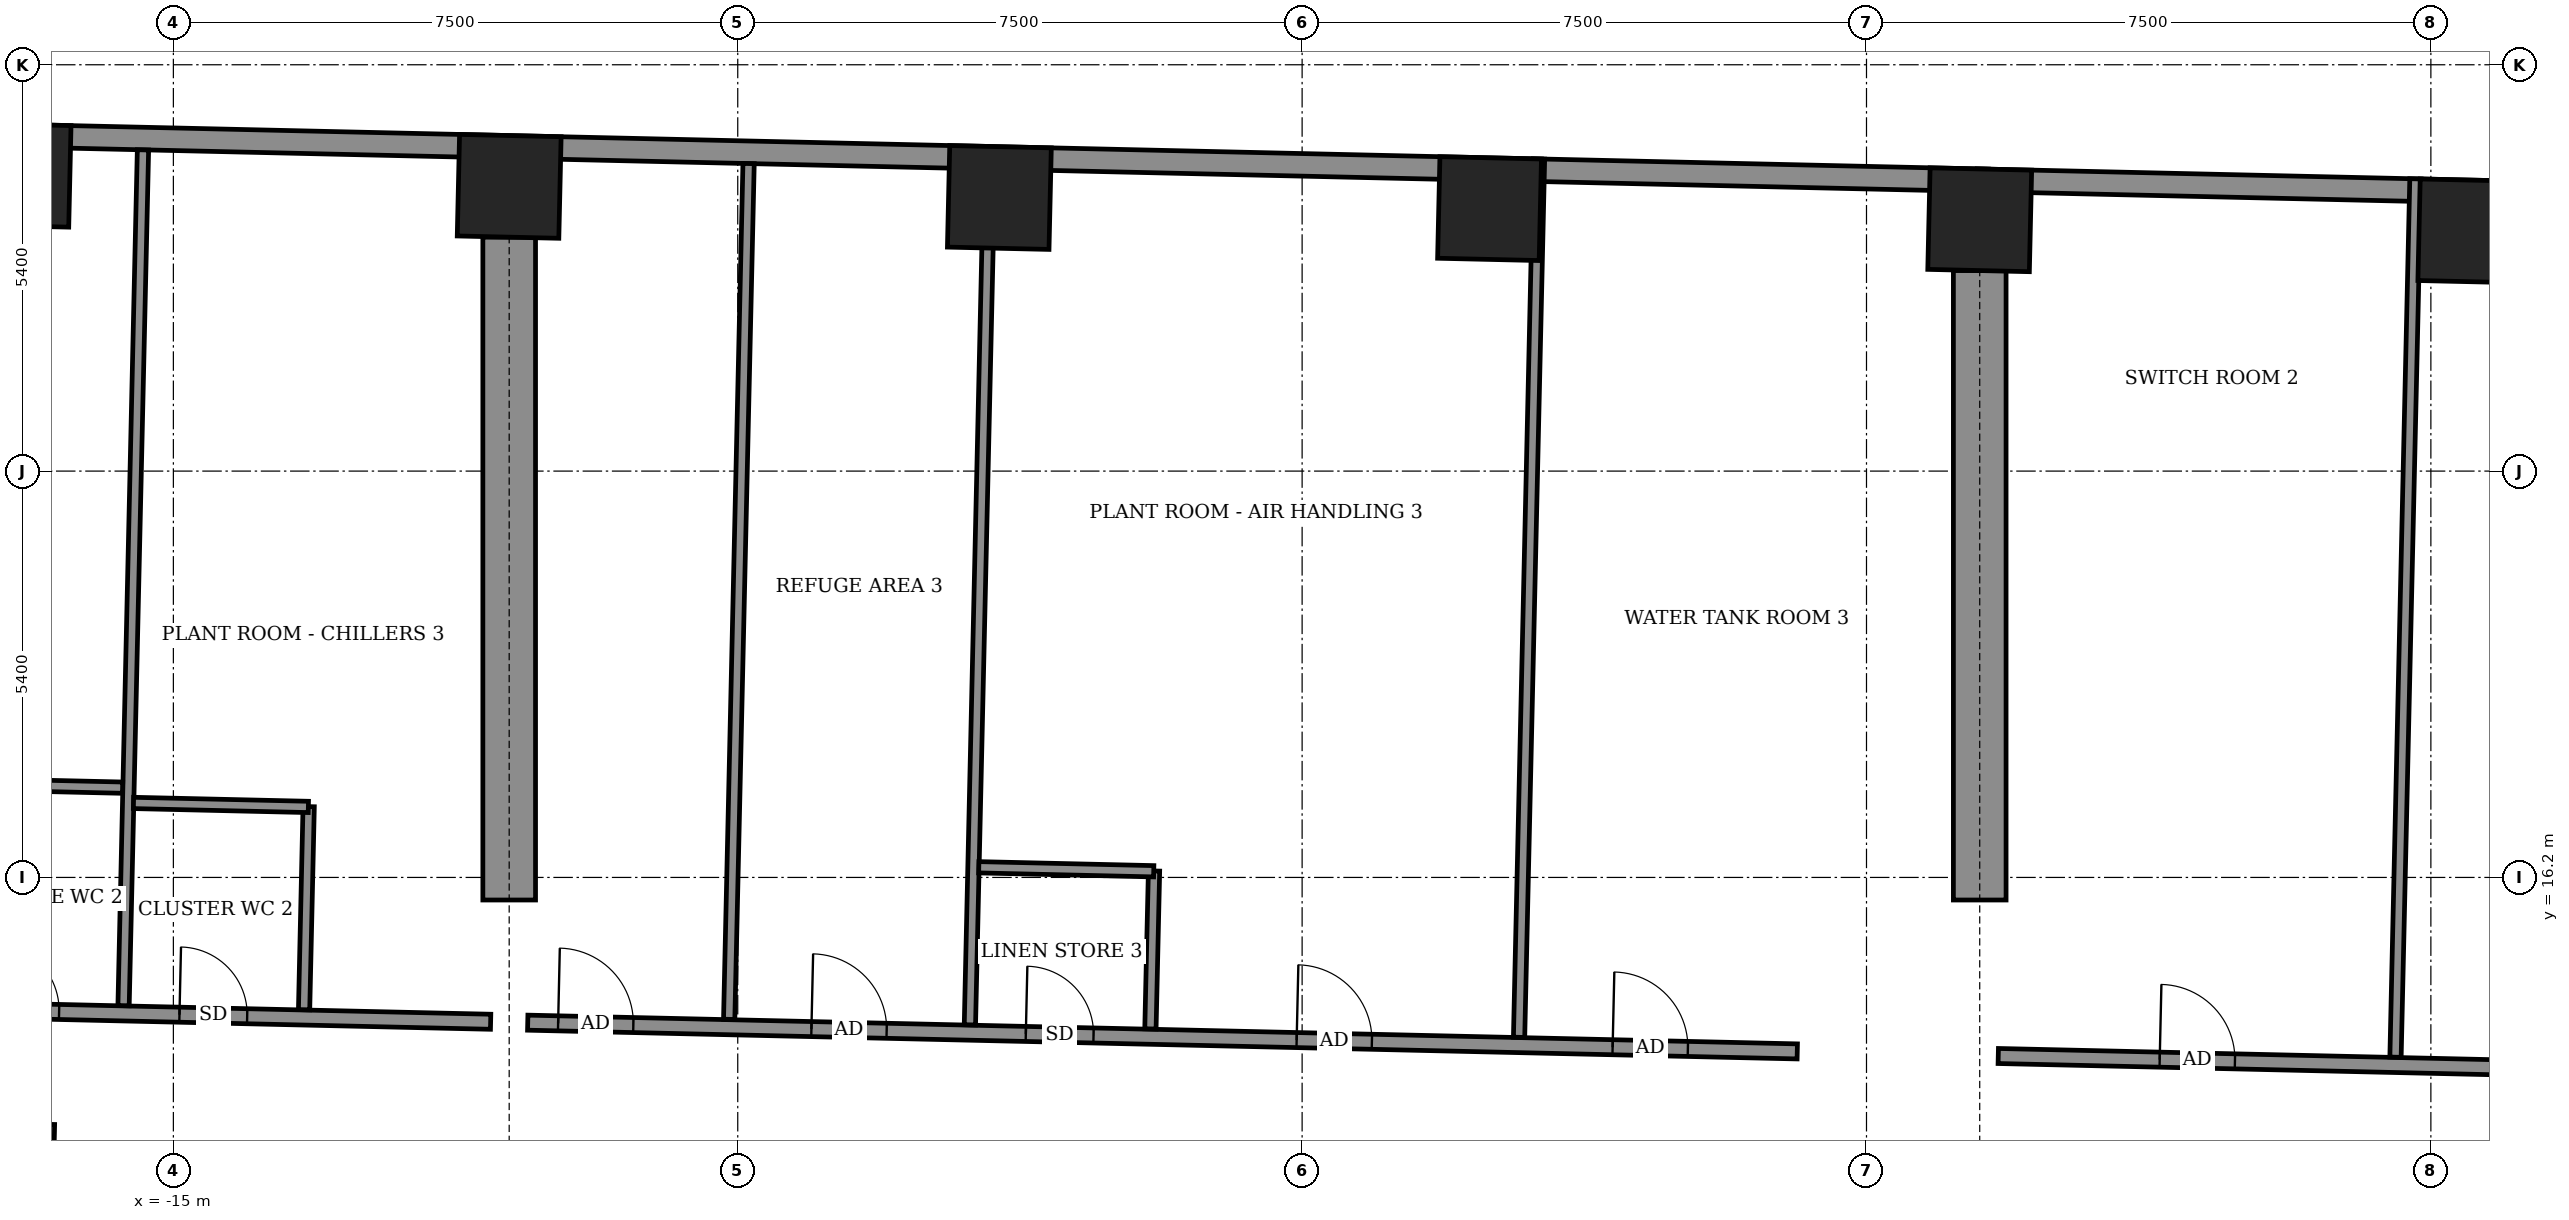
"""IFC4 building model, lengths in metres.
Left out: names, types, materials, properties, quantities, classifications, styles, units other than length and angle.
Written with IfcOpenShell. Run it as: python <this file> out.ifc"""

import sys

from ifc_helpers import new_model, si_unit, direction, frame, frame_2d, origin, origin_2d, place, context, subcontext, project, spatial, rectangle, extrude, element, fill, save


model = new_model("IFC4")
c1 = context("Model", 3, precision=1e-05, world=origin(), true_north=direction((0.0, 1.0)))
c2 = subcontext(c1, "Body", "Model", "MODEL_VIEW")
j1 = project(units=[si_unit("LENGTHUNIT", "METRE"), si_unit("PLANEANGLEUNIT", "RADIAN")], contexts=[c1])
p1 = place(None, origin())
s1 = spatial("IfcSite", under=j1, at=p1, CompositionType="ELEMENT")
p2 = place(p1, origin())
s2 = spatial("IfcBuilding", under=s1, at=p2, CompositionType="ELEMENT")
p3 = place(p2, frame((0.0, 0.0, 119.9)))
s3 = spatial("IfcBuildingStorey", under=s2, at=p3, CompositionType="ELEMENT", Elevation=119.9)
for number, where, z_axis, x_axis in (
    (1, (15.518, 24.792, -0.55), (0.0, 0.0, 1.0), (-1.0, 0.023, 0.0)),
    (2, (9.005, 24.94, -0.55), (0.0, 0.0, 1.0), (-1.0, 0.023, 0.0)),
    (3, (2.491, 25.088, -0.55), (0.0, 0.0, 1.0), (-1.0, 0.023, 0.0)),
    (4, (-4.023, 25.236, -0.55), (0.0, 0.0, 1.0), (-1.0, 0.023, 0.0)),
    (5, (-10.537, 25.384, -0.55), (0.0, 0.0, 1.0), (-1.0, 0.023, 0.0)),
    (6, (-17.05, 25.532, -0.55), (0.0, 0.0, 1.0), (-1.0, 0.023, 0.0)),
):
    element("IfcColumn", number, at=place(p3, frame(where, z_axis=z_axis, x_axis=x_axis)), inside=s3, PredefinedType="COLUMN", context=c2, shape_type="SweptSolid", body=[
        extrude(rectangle(XDim=1.35, YDim=1.35, at=origin_2d()), origin(), (0.0, 0.0, 1.0), 5.6),
    ])
p4 = place(p3, frame((9.005, 15.9, 0.0), z_axis=(0.0, 0.0, 1.0), x_axis=(0.0, 1.0, 0.0)))
e7 = element("IfcWall", 7, at=p4, inside=s3, PredefinedType="SHEAR", context=c2, shape_type="SweptSolid", body=[
    extrude(rectangle(XDim=8.365, YDim=0.7, at=frame_2d((4.183, 0.0))), origin(), (0.0, 0.0, 1.0), 3.0),
])
p5 = place(p3, frame((-10.537, 15.9, 0.0), z_axis=(0.0, 0.0, 1.0), x_axis=(0.0, 1.0, 0.0)))
e8 = element("IfcWall", 8, at=p5, inside=s3, PredefinedType="SHEAR", context=c2, shape_type="SweptSolid", body=[
    extrude(rectangle(XDim=8.809, YDim=0.7, at=frame_2d((4.405, 0.0))), origin(), (0.0, 0.0, 1.0), 3.0),
])
p6 = place(p3, frame((21.894, 25.173, 0.0), z_axis=(0.0, 0.0, 1.0), x_axis=(-0.999742661083, 0.022685052594, 0.0)))
e9 = element("IfcWall", 9, at=p6, inside=s3, PredefinedType="SOLIDWALL", context=c2, shape_type="SweptSolid", body=[
    extrude(rectangle(XDim=45.309, YDim=0.3, at=frame_2d((22.654, 0.0))), origin(), (0.0, 0.0, 1.0), 5.05),
])
p7 = place(p3, frame((-16.759, 9.368, 0.0), z_axis=(0.0, 0.0, 1.0), x_axis=(0.022819769377, 0.999739595157, 0.0)))
e10 = element("IfcWall", 10, at=p7, inside=s3, PredefinedType="PARTITIONING", context=c2, shape_type="SweptSolid", body=[
    extrude(rectangle(XDim=3.552, YDim=0.2, at=frame_2d((1.776, 0.0))), origin(), (0.0, 0.0, 1.0), 3.0),
])
p8 = place(p3, frame((-26.341, 14.635, 0.0), z_axis=(0.0, 0.0, 1.0), x_axis=(0.999742628706, -0.022686479412, 0.0)))
e11 = element("IfcWall", 11, at=p8, inside=s3, PredefinedType="PARTITIONING", context=c2, shape_type="SweptSolid", body=[
    extrude(rectangle(XDim=15.561, YDim=0.2, at=frame_2d((7.781, 0.0))), origin(), (0.0, 0.0, 1.0), 3.0),
])
p9 = place(p8, frame((11.425, 0.0, 0.0)))
e12 = element("IfcOpeningElement", 12, at=p9, cuts=e11, PredefinedType="OPENING", context=c2, shape_type="SweptSolid", body=[
    extrude(rectangle(XDim=0.9, YDim=2.1, at=frame_2d((0.45, 1.05))), frame((0.0, 0.11, 0.0), z_axis=(0.0, -1.0, 0.0), x_axis=(1.0, 0.0, 0.0)), (0.0, 0.0, 1.0), 0.22),
])
p10 = place(p8, frame((2.5, 0.0, 0.0)))
e13 = element("IfcOpeningElement", 13, at=p10, cuts=e11, PredefinedType="OPENING", context=c2, shape_type="SweptSolid", body=[
    extrude(rectangle(XDim=1.0, YDim=2.1, at=frame_2d((0.5, 1.05))), frame((0.0, 0.11, 0.0), z_axis=(0.0, -1.0, 0.0), x_axis=(1.0, 0.0, 0.0)), (0.0, 0.0, 1.0), 0.22),
])
p11 = place(p8, frame((8.925, 0.0, 0.0)))
e14 = element("IfcOpeningElement", 14, at=p11, cuts=e11, PredefinedType="OPENING", context=c2, shape_type="SweptSolid", body=[
    extrude(rectangle(XDim=0.9, YDim=2.1, at=frame_2d((0.45, 1.05))), frame((0.0, 0.11, 0.0), z_axis=(0.0, -1.0, 0.0), x_axis=(1.0, 0.0, 0.0)), (0.0, 0.0, 1.0), 0.22),
])
p12 = place(p3, frame((-10.291, 14.27, 0.0), z_axis=(0.0, 0.0, 1.0), x_axis=(0.999743654737, -0.022641219317, 0.0)))
e15 = element("IfcWall", 15, at=p12, inside=s3, PredefinedType="PARTITIONING", context=c2, shape_type="SweptSolid", body=[
    extrude(rectangle(XDim=16.875, YDim=0.2, at=frame_2d((8.438, 0.0))), origin(), (0.0, 0.0, 1.0), 3.0),
])
p13 = place(p12, frame((14.421, 0.0, 0.0)))
e16 = element("IfcOpeningElement", 16, at=p13, cuts=e15, PredefinedType="OPENING", context=c2, shape_type="SweptSolid", body=[
    extrude(rectangle(XDim=1.0, YDim=2.1, at=frame_2d((0.5, 1.05))), frame((0.0, 0.11, 0.0), z_axis=(0.0, -1.0, 0.0), x_axis=(1.0, 0.0, 0.0)), (0.0, 0.0, 1.0), 0.22),
])
p14 = place(p12, frame((10.221, 0.0, 0.0)))
e17 = element("IfcOpeningElement", 17, at=p14, cuts=e15, PredefinedType="OPENING", context=c2, shape_type="SweptSolid", body=[
    extrude(rectangle(XDim=1.0, YDim=2.1, at=frame_2d((0.5, 1.05))), frame((0.0, 0.11, 0.0), z_axis=(0.0, -1.0, 0.0), x_axis=(1.0, 0.0, 0.0)), (0.0, 0.0, 1.0), 0.22),
])
p15 = place(p12, frame((6.621, 0.0, 0.0)))
e18 = element("IfcOpeningElement", 18, at=p15, cuts=e15, PredefinedType="OPENING", context=c2, shape_type="SweptSolid", body=[
    extrude(rectangle(XDim=0.9, YDim=2.1, at=frame_2d((0.45, 1.05))), frame((0.0, 0.11, 0.0), z_axis=(0.0, -1.0, 0.0), x_axis=(1.0, 0.0, 0.0)), (0.0, 0.0, 1.0), 0.22),
])
p16 = place(p12, frame((3.771, 0.0, 0.0)))
e19 = element("IfcOpeningElement", 19, at=p16, cuts=e15, PredefinedType="OPENING", context=c2, shape_type="SweptSolid", body=[
    extrude(rectangle(XDim=1.0, YDim=2.1, at=frame_2d((0.5, 1.05))), frame((0.0, 0.11, 0.0), z_axis=(0.0, -1.0, 0.0), x_axis=(1.0, 0.0, 0.0)), (0.0, 0.0, 1.0), 0.22),
])
p17 = place(p12, frame((0.404, 0.0, 0.0)))
e20 = element("IfcOpeningElement", 20, at=p17, cuts=e15, PredefinedType="OPENING", context=c2, shape_type="SweptSolid", body=[
    extrude(rectangle(XDim=1.0, YDim=2.1, at=frame_2d((0.5, 1.05))), frame((0.0, 0.11, 0.0), z_axis=(0.0, -1.0, 0.0), x_axis=(1.0, 0.0, 0.0)), (0.0, 0.0, 1.0), 0.22),
])
p18 = place(p3, frame((9.251, 13.827, 0.0), z_axis=(0.0, 0.0, 1.0), x_axis=(0.999743033601, -0.022668629562, 0.0)))
e21 = element("IfcWall", 21, at=p18, inside=s3, PredefinedType="PARTITIONING", context=c2, shape_type="SweptSolid", body=[
    extrude(rectangle(XDim=15.132, YDim=0.2, at=frame_2d((7.566, 0.0))), origin(), (0.0, 0.0, 1.0), 3.0),
])
p19 = place(p18, frame((10.001, 0.0, 0.0)))
e22 = element("IfcOpeningElement", 22, at=p19, cuts=e21, PredefinedType="OPENING", context=c2, shape_type="SweptSolid", body=[
    extrude(rectangle(XDim=1.0, YDim=2.1, at=frame_2d((0.5, 1.05))), frame((0.0, 0.11, 0.0), z_axis=(0.0, -1.0, 0.0), x_axis=(1.0, 0.0, 0.0)), (0.0, 0.0, 1.0), 0.22),
])
p20 = place(p18, frame((2.146, 0.0, 0.0)))
e23 = element("IfcOpeningElement", 23, at=p20, cuts=e21, PredefinedType="OPENING", context=c2, shape_type="SweptSolid", body=[
    extrude(rectangle(XDim=1.0, YDim=2.1, at=frame_2d((0.5, 1.05))), frame((0.0, 0.11, 0.0), z_axis=(0.0, -1.0, 0.0), x_axis=(1.0, 0.0, 0.0)), (0.0, 0.0, 1.0), 0.22),
])
p21 = place(p3, frame((-15.662, 14.496, 0.0), z_axis=(0.0, 0.0, 1.0), x_axis=(0.022684842063, 0.99974266586, 0.0)))
e24 = element("IfcWall", 24, at=p21, inside=s3, PredefinedType="PARTITIONING", context=c2, shape_type="SweptSolid", body=[
    extrude(rectangle(XDim=11.376, YDim=0.15, at=frame_2d((5.688, 0.0))), origin(), (0.0, 0.0, 1.0), 4.45),
])
p22 = place(p3, frame((-13.263, 14.442, 0.0), z_axis=(0.0, 0.0, 1.0), x_axis=(0.022606377605, 0.999744443191, 0.0)))
e25 = element("IfcWall", 25, at=p22, inside=s3, PredefinedType="PARTITIONING", context=c2, shape_type="SweptSolid", body=[
    extrude(rectangle(XDim=2.7, YDim=0.15, at=frame_2d((1.35, 0.0))), origin(), (0.0, 0.0, 1.0), 5.05),
])
p23 = place(p3, frame((-7.614, 14.314, 0.0), z_axis=(0.0, 0.0, 1.0), x_axis=(0.022684355347, 0.999742676904, 0.0)))
e26 = element("IfcWall", 26, at=p23, inside=s3, PredefinedType="PARTITIONING", context=c2, shape_type="SweptSolid", body=[
    extrude(rectangle(XDim=11.376, YDim=0.15, at=frame_2d((5.688, 0.0))), origin(), (0.0, 0.0, 1.0), 4.45),
])
p24 = place(p3, frame((-4.415, 14.241, 0.0), z_axis=(0.0, 0.0, 1.0), x_axis=(0.022684355347, 0.999742676904, 0.0)))
e27 = element("IfcWall", 27, at=p24, inside=s3, PredefinedType="PARTITIONING", context=c2, shape_type="SweptSolid", body=[
    extrude(rectangle(XDim=11.376, YDim=0.15, at=frame_2d((5.688, 0.0))), origin(), (0.0, 0.0, 1.0), 5.05),
])
p25 = place(p3, frame((-2.016, 14.187, 0.0), z_axis=(0.0, 0.0, 1.0), x_axis=(0.022908956429, 0.999737555419, 0.0)))
e28 = element("IfcWall", 28, at=p25, inside=s3, PredefinedType="PARTITIONING", context=c2, shape_type="SweptSolid", body=[
    extrude(rectangle(XDim=2.099, YDim=0.15, at=frame_2d((1.05, 0.0))), origin(), (0.0, 0.0, 1.0), 5.05),
])
p26 = place(p3, frame((2.883, 14.075, 0.0), z_axis=(0.0, 0.0, 1.0), x_axis=(0.022686732602, 0.99974262296, 0.0)))
e29 = element("IfcWall", 29, at=p26, inside=s3, PredefinedType="PARTITIONING", context=c2, shape_type="SweptSolid", body=[
    extrude(rectangle(XDim=11.676, YDim=0.15, at=frame_2d((5.838, 0.0))), origin(), (0.0, 0.0, 1.0), 4.45),
])
p27 = place(p3, frame((14.53, 13.811, 0.0), z_axis=(0.0, 0.0, 1.0), x_axis=(0.022687206857, 0.999742612198, 0.0)))
e30 = element("IfcWall", 30, at=p27, inside=s3, PredefinedType="PARTITIONING", context=c2, shape_type="SweptSolid", body=[
    extrude(rectangle(XDim=11.676, YDim=0.15, at=frame_2d((5.838, 0.0))), origin(), (0.0, 0.0, 1.0), 4.45),
])
p28 = place(p3, frame((-4.297, 16.335, 0.0), z_axis=(0.0, 0.0, 1.0), x_axis=(0.99974053329, -0.022778632478, 0.0)))
e31 = element("IfcWall", 31, at=p28, inside=s3, PredefinedType="PARTITIONING", context=c2, shape_type="SweptSolid", body=[
    extrude(rectangle(XDim=2.326, YDim=0.15, at=frame_2d((1.163, 0.0))), origin(), (0.0, 0.0, 1.0), 5.05),
])
p29 = place(p3, frame((-15.53, 17.19, 0.0), z_axis=(0.0, 0.0, 1.0), x_axis=(0.999740260747, -0.02279059109, 0.0)))
e32 = element("IfcWall", 32, at=p29, inside=s3, PredefinedType="PARTITIONING", context=c2, shape_type="SweptSolid", body=[
    extrude(rectangle(XDim=2.324, YDim=0.15, at=frame_2d((1.162, 0.0))), origin(), (0.0, 0.0, 1.0), 5.05),
])
p30 = place(p3, frame((-18.2, 17.451, 0.0), z_axis=(0.0, 0.0, 1.0), x_axis=(0.999737525802, -0.022910248851, 0.0)))
e33 = element("IfcWall", 33, at=p30, inside=s3, PredefinedType="PARTITIONING", context=c2, shape_type="SweptSolid", body=[
    extrude(rectangle(XDim=2.526, YDim=0.15, at=frame_2d((1.263, 0.0))), origin(), (0.0, 0.0, 1.0), 5.05),
])
p31 = place(p3, frame((9.018, 24.365, 0.0), z_axis=(0.0, 0.0, 1.0), x_axis=(0.02226010787, 0.9997522131, 0.0)))
e34 = element("IfcWall", 34, at=p31, inside=s3, PredefinedType="PARTITIONING", context=c2, shape_type="SweptSolid", body=[
    extrude(rectangle(XDim=1.25, YDim=0.15, at=frame_2d((0.625, 0.0))), origin(), (0.0, 0.0, 1.0), 5.05),
])
p32 = place(p20, origin())
e35 = element("IfcDoor", 35, at=p32, inside=s3, OperationType="SINGLE_SWING_LEFT", PredefinedType="DOOR", context=c2, shape_type="SweptSolid", body=[
    extrude(rectangle(XDim=1.0, YDim=2.1, at=frame_2d((0.5, 1.05))), frame((0.0, 0.025, 0.0), z_axis=(0.0, -1.0, 0.0), x_axis=(1.0, 0.0, 0.0)), (0.0, 0.0, 1.0), 0.05),
])
fill(e23, e35)
p33 = place(p13, origin())
e36 = element("IfcDoor", 36, at=p33, inside=s3, OperationType="SINGLE_SWING_RIGHT", PredefinedType="DOOR", context=c2, shape_type="SweptSolid", body=[
    extrude(rectangle(XDim=1.0, YDim=2.1, at=frame_2d((0.5, 1.05))), frame((0.0, 0.025, 0.0), z_axis=(0.0, -1.0, 0.0), x_axis=(1.0, 0.0, 0.0)), (0.0, 0.0, 1.0), 0.05),
])
fill(e16, e36)
p34 = place(p14, origin())
e37 = element("IfcDoor", 37, at=p34, inside=s3, OperationType="SINGLE_SWING_LEFT", PredefinedType="DOOR", context=c2, shape_type="SweptSolid", body=[
    extrude(rectangle(XDim=1.0, YDim=2.1, at=frame_2d((0.5, 1.05))), frame((0.0, 0.025, 0.0), z_axis=(0.0, -1.0, 0.0), x_axis=(1.0, 0.0, 0.0)), (0.0, 0.0, 1.0), 0.05),
])
fill(e17, e37)
p35 = place(p15, origin())
e38 = element("IfcDoor", 38, at=p35, inside=s3, OperationType="SINGLE_SWING_LEFT", PredefinedType="DOOR", context=c2, shape_type="SweptSolid", body=[
    extrude(rectangle(XDim=0.9, YDim=2.1, at=frame_2d((0.45, 1.05))), frame((0.0, 0.025, 0.0), z_axis=(0.0, -1.0, 0.0), x_axis=(1.0, 0.0, 0.0)), (0.0, 0.0, 1.0), 0.05),
])
fill(e18, e38)
p36 = place(p16, origin())
e39 = element("IfcDoor", 39, at=p36, inside=s3, OperationType="SINGLE_SWING_RIGHT", PredefinedType="DOOR", context=c2, shape_type="SweptSolid", body=[
    extrude(rectangle(XDim=1.0, YDim=2.1, at=frame_2d((0.5, 1.05))), frame((0.0, 0.025, 0.0), z_axis=(0.0, -1.0, 0.0), x_axis=(1.0, 0.0, 0.0)), (0.0, 0.0, 1.0), 0.05),
])
fill(e19, e39)
p37 = place(p17, origin())
e40 = element("IfcDoor", 40, at=p37, inside=s3, OperationType="SINGLE_SWING_LEFT", PredefinedType="DOOR", context=c2, shape_type="SweptSolid", body=[
    extrude(rectangle(XDim=1.0, YDim=2.1, at=frame_2d((0.5, 1.05))), frame((0.0, 0.025, 0.0), z_axis=(0.0, -1.0, 0.0), x_axis=(1.0, 0.0, 0.0)), (0.0, 0.0, 1.0), 0.05),
])
fill(e20, e40)
p38 = place(p9, origin())
e41 = element("IfcDoor", 41, at=p38, inside=s3, OperationType="SINGLE_SWING_RIGHT", PredefinedType="DOOR", context=c2, shape_type="SweptSolid", body=[
    extrude(rectangle(XDim=0.9, YDim=2.1, at=frame_2d((0.45, 1.05))), frame((0.0, 0.025, 0.0), z_axis=(0.0, -1.0, 0.0), x_axis=(1.0, 0.0, 0.0)), (0.0, 0.0, 1.0), 0.05),
])
fill(e12, e41)
p39 = place(p11, origin())
e42 = element("IfcDoor", 42, at=p39, inside=s3, OperationType="SINGLE_SWING_LEFT", PredefinedType="DOOR", context=c2, shape_type="SweptSolid", body=[
    extrude(rectangle(XDim=0.9, YDim=2.1, at=frame_2d((0.45, 1.05))), frame((0.0, 0.025, 0.0), z_axis=(0.0, -1.0, 0.0), x_axis=(1.0, 0.0, 0.0)), (0.0, 0.0, 1.0), 0.05),
])
fill(e14, e42)
save(model, sys.argv[1])
